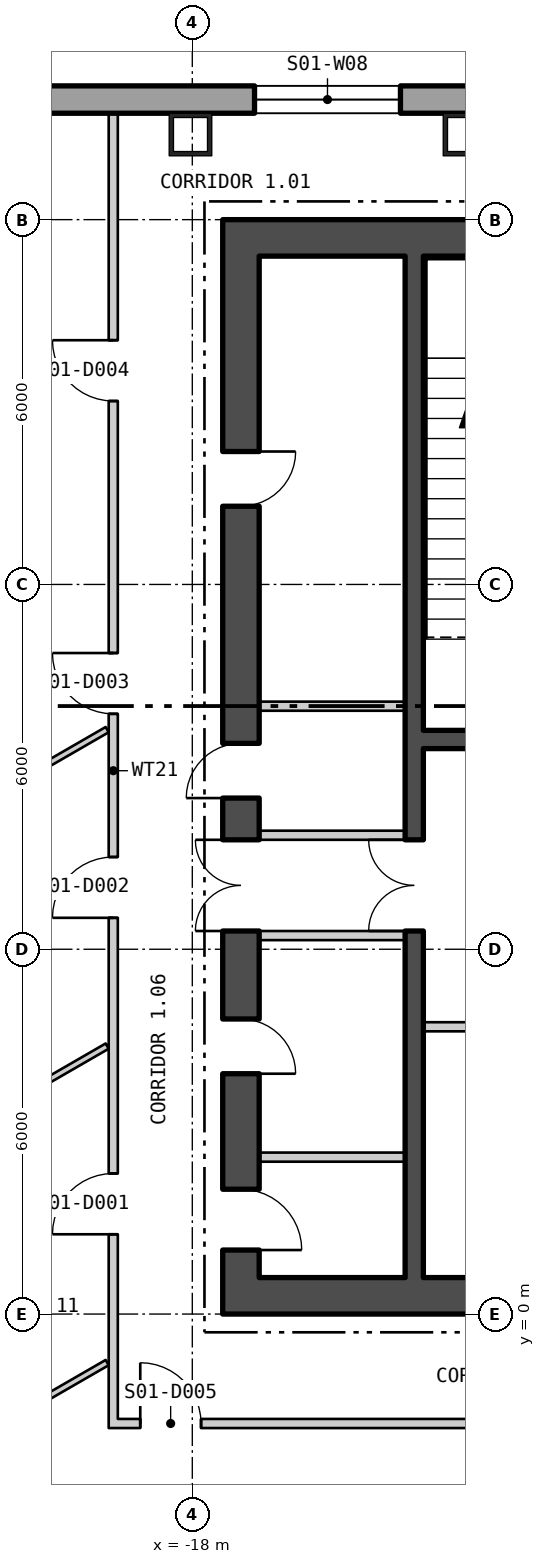
"""IFC4 building model, lengths in metres.
Left out: names, types, materials, properties, quantities, classifications, styles, units other than length and angle.
Written with IfcOpenShell. Run it as: python <this file> out.ifc"""

import sys

from ifc_helpers import new_model, si_unit, direction, frame, frame_2d, origin, origin_2d, place, context, subcontext, project, spatial, polyline, rectangle, hollow_rectangle, outline, extrude, element, fill, save


model = new_model("IFC4")
c1 = context("Model", 3, precision=1e-05, world=origin(), true_north=direction((0.0, 1.0)))
c2 = subcontext(c1, "Body", "Model", "MODEL_VIEW")
j1 = project(units=[si_unit("LENGTHUNIT", "METRE"), si_unit("PLANEANGLEUNIT", "RADIAN")], contexts=[c1])
p1 = place(None, origin())
s1 = spatial("IfcSite", under=j1, at=p1, CompositionType="ELEMENT")
p2 = place(p1, origin())
s2 = spatial("IfcBuilding", under=s1, at=p2, CompositionType="ELEMENT")
p3 = place(p2, frame((0.0, 0.0, 28.8)))
s3 = spatial("IfcBuildingStorey", under=s2, at=p3, CompositionType="ELEMENT", Elevation=28.8)
p4 = place(p3, frame((-13.523, 19.4, 0.0), z_axis=(0.0, 0.0, 1.0), x_axis=(-1.0, 0.0, 0.0)))
e1 = element("IfcColumn", 1, at=p4, inside=s3, PredefinedType="COLUMN", context=c2, shape_type="SweptSolid", body=[
    extrude(hollow_rectangle(XDim=0.7, YDim=0.7, WallThickness=0.07, at=origin_2d()), origin(), (0.0, 0.0, 1.0), 4.5),
])
p5 = place(p3, frame((-18.03, 19.4, -0.85), z_axis=(0.0, 0.0, 1.0), x_axis=(-1.0, 0.0, 0.0)))
e2 = element("IfcColumn", 2, at=p5, inside=s3, PredefinedType="COLUMN", context=c2, shape_type="SweptSolid", body=[
    extrude(hollow_rectangle(XDim=0.7, YDim=0.7, WallThickness=0.07, at=origin_2d()), origin(), (0.0, 0.0, 1.0), 5.35),
])
p6 = place(p3, frame((22.87, 19.975, -0.4), z_axis=(0.0, 0.0, 1.0), x_axis=(-1.0, 0.0, 0.0)))
e3 = element("IfcWall", 3, at=p6, inside=s3, PredefinedType="SOLIDWALL", context=c2, shape_type="SweptSolid", body=[
    extrude(outline(polyline([(-0.13, -0.225), (45.87, -0.225), (45.61, 0.225), (0.13, 0.225), (-0.13, -0.225)])), origin(), (0.0, 0.0, 1.0), 4.5),
])
p7 = place(p6, frame((5.893, 0.0, 1.3)))
e4 = element("IfcOpeningElement", 4, at=p7, cuts=e3, PredefinedType="OPENING", context=c2, shape_type="SweptSolid", body=[
    extrude(rectangle(XDim=2.4, YDim=2.6, at=frame_2d((1.2, 1.3))), frame((0.0, 0.235, 0.0), z_axis=(0.0, -1.0, 0.0), x_axis=(1.0, 0.0, 0.0)), (0.0, 0.0, 1.0), 0.47),
])
p8 = place(p6, frame((10.401, 0.0, 1.3)))
e5 = element("IfcOpeningElement", 5, at=p8, cuts=e3, PredefinedType="OPENING", context=c2, shape_type="SweptSolid", body=[
    extrude(rectangle(XDim=2.4, YDim=2.6, at=frame_2d((1.2, 1.3))), frame((0.0, 0.235, 0.0), z_axis=(0.0, -1.0, 0.0), x_axis=(1.0, 0.0, 0.0)), (0.0, 0.0, 1.0), 0.47),
])
p9 = place(p6, frame((14.909, 0.0, 1.3)))
e6 = element("IfcOpeningElement", 6, at=p9, cuts=e3, PredefinedType="OPENING", context=c2, shape_type="SweptSolid", body=[
    extrude(rectangle(XDim=2.4, YDim=2.6, at=frame_2d((1.2, 1.3))), frame((0.0, 0.235, 0.0), z_axis=(0.0, -1.0, 0.0), x_axis=(1.0, 0.0, 0.0)), (0.0, 0.0, 1.0), 0.47),
])
p10 = place(p6, frame((19.416, 0.0, 1.3)))
e7 = element("IfcOpeningElement", 7, at=p10, cuts=e3, PredefinedType="OPENING", context=c2, shape_type="SweptSolid", body=[
    extrude(rectangle(XDim=2.4, YDim=2.6, at=frame_2d((1.2, 1.3))), frame((0.0, 0.235, 0.0), z_axis=(0.0, -1.0, 0.0), x_axis=(1.0, 0.0, 0.0)), (0.0, 0.0, 1.0), 0.47),
])
p11 = place(p6, frame((23.924, 0.0, 1.3)))
e8 = element("IfcOpeningElement", 8, at=p11, cuts=e3, PredefinedType="OPENING", context=c2, shape_type="SweptSolid", body=[
    extrude(rectangle(XDim=2.4, YDim=2.6, at=frame_2d((1.2, 1.3))), frame((0.0, 0.235, 0.0), z_axis=(0.0, -1.0, 0.0), x_axis=(1.0, 0.0, 0.0)), (0.0, 0.0, 1.0), 0.47),
])
p12 = place(p6, frame((28.431, 0.0, 1.3)))
e9 = element("IfcOpeningElement", 9, at=p12, cuts=e3, PredefinedType="OPENING", context=c2, shape_type="SweptSolid", body=[
    extrude(rectangle(XDim=2.4, YDim=2.6, at=frame_2d((1.2, 1.3))), frame((0.0, 0.235, 0.0), z_axis=(0.0, -1.0, 0.0), x_axis=(1.0, 0.0, 0.0)), (0.0, 0.0, 1.0), 0.47),
])
p13 = place(p6, frame((32.939, 0.0, 1.3)))
e10 = element("IfcOpeningElement", 10, at=p13, cuts=e3, PredefinedType="OPENING", context=c2, shape_type="SweptSolid", body=[
    extrude(rectangle(XDim=2.4, YDim=2.6, at=frame_2d((1.2, 1.3))), frame((0.0, 0.235, 0.0), z_axis=(0.0, -1.0, 0.0), x_axis=(1.0, 0.0, 0.0)), (0.0, 0.0, 1.0), 0.47),
])
p14 = place(p6, frame((37.447, 0.0, 1.3)))
e11 = element("IfcOpeningElement", 11, at=p14, cuts=e3, PredefinedType="OPENING", context=c2, shape_type="SweptSolid", body=[
    extrude(rectangle(XDim=2.4, YDim=2.6, at=frame_2d((1.2, 1.3))), frame((0.0, 0.235, 0.0), z_axis=(0.0, -1.0, 0.0), x_axis=(1.0, 0.0, 0.0)), (0.0, 0.0, 1.0), 0.47),
])
p15 = place(p3, frame((-28.74, 9.808, -0.23), z_axis=(0.0, 0.0, 1.0), x_axis=(0.499999764979, -0.866025539474, 0.0)))
e12 = element("IfcWall", 12, at=p15, inside=s3, PredefinedType="SOLIDWALL", context=c2, shape_type="SweptSolid", body=[
    extrude(outline(polyline([(-0.13, -0.225), (45.87, -0.225), (45.61, 0.225), (0.13, 0.225), (-0.13, -0.225)])), origin(), (0.0, 0.0, 1.0), 4.55),
])
p16 = place(p15, frame((1.724, 0.0, 0.23)))
e13 = element("IfcOpeningElement", 13, at=p16, cuts=e12, PredefinedType="OPENING", context=c2, shape_type="SweptSolid", body=[
    extrude(rectangle(XDim=1.8, YDim=2.4, at=frame_2d((0.9, 1.2))), frame((0.0, 0.235, 0.0), z_axis=(0.0, -1.0, 0.0), x_axis=(1.0, 0.0, 0.0)), (0.0, 0.0, 1.0), 0.47),
])
p17 = place(p15, frame((5.893, 0.0, 1.13)))
e14 = element("IfcOpeningElement", 14, at=p17, cuts=e12, PredefinedType="OPENING", context=c2, shape_type="SweptSolid", body=[
    extrude(rectangle(XDim=2.4, YDim=2.6, at=frame_2d((1.2, 1.3))), frame((0.0, 0.235, 0.0), z_axis=(0.0, -1.0, 0.0), x_axis=(1.0, 0.0, 0.0)), (0.0, 0.0, 1.0), 0.47),
])
p18 = place(p15, frame((10.401, 0.0, 1.13)))
e15 = element("IfcOpeningElement", 15, at=p18, cuts=e12, PredefinedType="OPENING", context=c2, shape_type="SweptSolid", body=[
    extrude(rectangle(XDim=2.4, YDim=2.6, at=frame_2d((1.2, 1.3))), frame((0.0, 0.235, 0.0), z_axis=(0.0, -1.0, 0.0), x_axis=(1.0, 0.0, 0.0)), (0.0, 0.0, 1.0), 0.47),
])
p19 = place(p15, frame((14.909, 0.0, 1.13)))
e16 = element("IfcOpeningElement", 16, at=p19, cuts=e12, PredefinedType="OPENING", context=c2, shape_type="SweptSolid", body=[
    extrude(rectangle(XDim=2.4, YDim=2.6, at=frame_2d((1.2, 1.3))), frame((0.0, 0.235, 0.0), z_axis=(0.0, -1.0, 0.0), x_axis=(1.0, 0.0, 0.0)), (0.0, 0.0, 1.0), 0.47),
])
p20 = place(p15, frame((19.416, 0.0, 1.13)))
e17 = element("IfcOpeningElement", 17, at=p20, cuts=e12, PredefinedType="OPENING", context=c2, shape_type="SweptSolid", body=[
    extrude(rectangle(XDim=2.4, YDim=2.6, at=frame_2d((1.2, 1.3))), frame((0.0, 0.235, 0.0), z_axis=(0.0, -1.0, 0.0), x_axis=(1.0, 0.0, 0.0)), (0.0, 0.0, 1.0), 0.47),
])
p21 = place(p15, frame((23.924, 0.0, 1.13)))
e18 = element("IfcOpeningElement", 18, at=p21, cuts=e12, PredefinedType="OPENING", context=c2, shape_type="SweptSolid", body=[
    extrude(rectangle(XDim=2.4, YDim=2.6, at=frame_2d((1.2, 1.3))), frame((0.0, 0.235, 0.0), z_axis=(0.0, -1.0, 0.0), x_axis=(1.0, 0.0, 0.0)), (0.0, 0.0, 1.0), 0.47),
])
p22 = place(p15, frame((28.431, 0.0, 1.13)))
e19 = element("IfcOpeningElement", 19, at=p22, cuts=e12, PredefinedType="OPENING", context=c2, shape_type="SweptSolid", body=[
    extrude(rectangle(XDim=2.4, YDim=2.6, at=frame_2d((1.2, 1.3))), frame((0.0, 0.235, 0.0), z_axis=(0.0, -1.0, 0.0), x_axis=(1.0, 0.0, 0.0)), (0.0, 0.0, 1.0), 0.47),
])
p23 = place(p15, frame((33.239, 0.0, 0.23)))
e20 = element("IfcOpeningElement", 20, at=p23, cuts=e12, PredefinedType="OPENING", context=c2, shape_type="SweptSolid", body=[
    extrude(rectangle(XDim=1.8, YDim=2.4, at=frame_2d((0.9, 1.2))), frame((0.0, 0.235, 0.0), z_axis=(0.0, -1.0, 0.0), x_axis=(1.0, 0.0, 0.0)), (0.0, 0.0, 1.0), 0.47),
])
p24 = place(p15, frame((37.447, 0.0, 1.13)))
e21 = element("IfcOpeningElement", 21, at=p24, cuts=e12, PredefinedType="OPENING", context=c2, shape_type="SweptSolid", body=[
    extrude(rectangle(XDim=2.4, YDim=2.6, at=frame_2d((1.2, 1.3))), frame((0.0, 0.235, 0.0), z_axis=(0.0, -1.0, 0.0), x_axis=(1.0, 0.0, 0.0)), (0.0, 0.0, 1.0), 0.47),
])
p25 = place(p15, frame((41.916, 0.0, 1.13)))
e22 = element("IfcOpeningElement", 22, at=p25, cuts=e12, PredefinedType="OPENING", context=c2, shape_type="SweptSolid", body=[
    extrude(rectangle(XDim=2.4, YDim=2.6, at=frame_2d((1.2, 1.3))), frame((0.0, 0.235, 0.0), z_axis=(0.0, -1.0, 0.0), x_axis=(1.0, 0.0, 0.0)), (0.0, 0.0, 1.0), 0.47),
])
p26 = place(p3, frame((-17.5, 0.3, 0.0), z_axis=(0.0, 0.0, 1.0), x_axis=(1.0, 0.0, 0.0)))
e23 = element("IfcWall", 23, at=p26, inside=s3, PredefinedType="SHEAR", context=c2, shape_type="SweptSolid", body=[
    extrude(rectangle(XDim=35.0, YDim=0.6, at=frame_2d((17.5, 0.0))), origin(), (0.0, 0.0, 1.0), 4.3),
])
p27 = place(p26, frame((12.0, 0.0, 0.0)))
e24 = element("IfcOpeningElement", 24, at=p27, cuts=e23, PredefinedType="OPENING", context=c2, shape_type="SweptSolid", body=[
    extrude(rectangle(XDim=1.8, YDim=2.4, at=frame_2d((0.9, 1.2))), frame((0.0, 0.31, 0.0), z_axis=(0.0, -1.0, 0.0), x_axis=(1.0, 0.0, 0.0)), (0.0, 0.0, 1.0), 0.62),
])
p28 = place(p26, frame((22.0, 0.0, 0.0)))
e25 = element("IfcOpeningElement", 25, at=p28, cuts=e23, PredefinedType="OPENING", context=c2, shape_type="SweptSolid", body=[
    extrude(rectangle(XDim=1.8, YDim=2.4, at=frame_2d((0.9, 1.2))), frame((0.0, 0.31, 0.0), z_axis=(0.0, -1.0, 0.0), x_axis=(1.0, 0.0, 0.0)), (0.0, 0.0, 1.0), 0.62),
])
p29 = place(p3, frame((-17.5, 17.7, 0.0), z_axis=(0.0, 0.0, 1.0), x_axis=(1.0, 0.0, 0.0)))
e26 = element("IfcWall", 26, at=p29, inside=s3, PredefinedType="SHEAR", context=c2, shape_type="SweptSolid", body=[
    extrude(rectangle(XDim=35.0, YDim=0.6, at=frame_2d((17.5, 0.0))), origin(), (0.0, 0.0, 1.0), 4.3),
])
p30 = place(p3, frame((-17.2, 0.6, 0.0), z_axis=(0.0, 0.0, 1.0), x_axis=(0.0, 1.0, 0.0)))
e27 = element("IfcWall", 27, at=p30, inside=s3, PredefinedType="SHEAR", context=c2, shape_type="SweptSolid", body=[
    extrude(rectangle(XDim=16.8, YDim=0.6, at=frame_2d((8.4, 0.0))), origin(), (0.0, 0.0, 1.0), 4.3),
])
p31 = place(p30, frame((5.7, 0.0, 0.0)))
e28 = element("IfcOpeningElement", 28, at=p31, cuts=e27, PredefinedType="OPENING", context=c2, shape_type="SweptSolid", body=[
    extrude(rectangle(XDim=1.5, YDim=2.1, at=frame_2d((0.75, 1.05))), frame((0.0, 0.31, 0.0), z_axis=(0.0, -1.0, 0.0), x_axis=(1.0, 0.0, 0.0)), (0.0, 0.0, 1.0), 0.62),
])
p32 = place(p30, frame((0.453, 0.0, 0.0)))
e29 = element("IfcOpeningElement", 29, at=p32, cuts=e27, PredefinedType="OPENING", context=c2, shape_type="SweptSolid", body=[
    extrude(rectangle(XDim=1.0, YDim=2.1, at=frame_2d((0.5, 1.05))), frame((0.0, 0.31, 0.0), z_axis=(0.0, -1.0, 0.0), x_axis=(1.0, 0.0, 0.0)), (0.0, 0.0, 1.0), 0.62),
])
p33 = place(p30, frame((3.353, 0.0, 0.0)))
e30 = element("IfcOpeningElement", 30, at=p33, cuts=e27, PredefinedType="OPENING", context=c2, shape_type="SweptSolid", body=[
    extrude(rectangle(XDim=0.9, YDim=2.1, at=frame_2d((0.45, 1.05))), frame((0.0, 0.31, 0.0), z_axis=(0.0, -1.0, 0.0), x_axis=(1.0, 0.0, 0.0)), (0.0, 0.0, 1.0), 0.62),
])
p34 = place(p30, frame((7.886, 0.0, 0.0)))
e31 = element("IfcOpeningElement", 31, at=p34, cuts=e27, PredefinedType="OPENING", context=c2, shape_type="SweptSolid", body=[
    extrude(rectangle(XDim=0.9, YDim=2.1, at=frame_2d((0.45, 1.05))), frame((0.0, 0.31, 0.0), z_axis=(0.0, -1.0, 0.0), x_axis=(1.0, 0.0, 0.0)), (0.0, 0.0, 1.0), 0.62),
])
p35 = place(p30, frame((12.686, 0.0, 0.0)))
e32 = element("IfcOpeningElement", 32, at=p35, cuts=e27, PredefinedType="OPENING", context=c2, shape_type="SweptSolid", body=[
    extrude(rectangle(XDim=0.9, YDim=2.1, at=frame_2d((0.45, 1.05))), frame((0.0, 0.31, 0.0), z_axis=(0.0, -1.0, 0.0), x_axis=(1.0, 0.0, 0.0)), (0.0, 0.0, 1.0), 0.62),
])
p36 = place(p3, frame((-14.35, 0.6, 0.0), z_axis=(0.0, 0.0, 1.0), x_axis=(0.0, 1.0, 0.0)))
e33 = element("IfcWall", 33, at=p36, inside=s3, PredefinedType="SHEAR", context=c2, shape_type="SweptSolid", body=[
    extrude(rectangle(XDim=16.8, YDim=0.3, at=frame_2d((8.4, 0.0))), origin(), (0.0, 0.0, 1.0), 4.3),
])
p37 = place(p36, frame((5.7, 0.0, 0.0)))
e34 = element("IfcOpeningElement", 34, at=p37, cuts=e33, PredefinedType="OPENING", context=c2, shape_type="SweptSolid", body=[
    extrude(rectangle(XDim=1.5, YDim=2.1, at=frame_2d((0.75, 1.05))), frame((0.0, 0.16, 0.0), z_axis=(0.0, -1.0, 0.0), x_axis=(1.0, 0.0, 0.0)), (0.0, 0.0, 1.0), 0.32),
])
p38 = place(p3, frame((-14.2, 9.45, 0.0), z_axis=(0.0, 0.0, 1.0), x_axis=(1.0, 0.0, 0.0)))
e35 = element("IfcWall", 35, at=p38, inside=s3, PredefinedType="SHEAR", context=c2, shape_type="SweptSolid", body=[
    extrude(rectangle(XDim=3.2, YDim=0.3, at=frame_2d((1.6, 0.0))), origin(), (0.0, 0.0, 1.0), 4.3),
])
p39 = place(p38, frame((1.0, 0.0, 0.0)))
e36 = element("IfcOpeningElement", 36, at=p39, cuts=e35, PredefinedType="OPENING", context=c2, shape_type="SweptSolid", body=[
    extrude(rectangle(XDim=1.2, YDim=2.1, at=frame_2d((0.6, 1.05))), frame((0.0, 0.16, 0.0), z_axis=(0.0, -1.0, 0.0), x_axis=(1.0, 0.0, 0.0)), (0.0, 0.0, 1.0), 0.32),
])
p40 = place(p3, frame((-14.2, 4.725, 0.0), z_axis=(0.0, 0.0, 1.0), x_axis=(1.0, 0.0, 0.0)))
e37 = element("IfcWall", 37, at=p40, inside=s3, PredefinedType="PARTITIONING", context=c2, shape_type="SweptSolid", body=[
    extrude(rectangle(XDim=3.2, YDim=0.15, at=frame_2d((1.6, 0.0))), origin(), (0.0, 0.0, 1.0), 4.3),
])
for number, where, z_axis, x_axis in (
    (38, (-16.9, 6.225, 0.0), (0.0, 0.0, 1.0), (1.0, 0.0, 0.0)),
    (39, (-16.9, 7.875, 0.0), (0.0, 0.0, 1.0), (1.0, 0.0, 0.0)),
    (40, (-16.9, 2.581, 0.0), (0.0, 0.0, 1.0), (1.0, 0.0, 0.0)),
    (41, (-16.9, 9.998, 0.0), (0.0, 0.0, 1.0), (1.0, 0.0, 0.0)),
):
    element("IfcWall", number, at=place(p3, frame(where, z_axis=z_axis, x_axis=x_axis)), inside=s3, PredefinedType="PARTITIONING", context=c2, shape_type="SweptSolid", body=[
        extrude(rectangle(XDim=2.4, YDim=0.15, at=frame_2d((1.2, 0.0))), origin(), (0.0, 0.0, 1.0), 4.3),
    ])
p41 = place(p3, frame((-25.736, 5.954, 0.0), z_axis=(0.0, 0.0, 1.0), x_axis=(0.866030807744, 0.499990639951, 0.0)))
e42 = element("IfcWall", 42, at=p41, inside=s3, PredefinedType="PARTITIONING", context=c2, shape_type="SweptSolid", body=[
    extrude(rectangle(XDim=7.316, YDim=0.1, at=frame_2d((3.658, 0.0))), origin(), (0.0, 0.0, 1.0), 4.3),
])
p42 = place(p3, frame((-23.482, 2.05, 0.0), z_axis=(0.0, 0.0, 1.0), x_axis=(0.866001867101, 0.500040764516, 0.0)))
e43 = element("IfcWall", 43, at=p42, inside=s3, PredefinedType="PARTITIONING", context=c2, shape_type="SweptSolid", body=[
    extrude(rectangle(XDim=4.714, YDim=0.1, at=frame_2d((2.357, 0.0))), origin(), (0.0, 0.0, 1.0), 4.3),
])
p43 = place(p3, frame((-21.228, -1.853, 0.0), z_axis=(0.0, 0.0, 1.0), x_axis=(0.866106696208, 0.499859170951, 0.0)))
e44 = element("IfcWall", 44, at=p43, inside=s3, PredefinedType="PARTITIONING", context=c2, shape_type="SweptSolid", body=[
    extrude(rectangle(XDim=2.111, YDim=0.1, at=frame_2d((1.055, 0.0))), origin(), (0.0, 0.0, 1.0), 4.3),
])
p44 = place(p3, frame((-19.3, -1.875, 0.0), z_axis=(0.0, 0.0, 1.0), x_axis=(0.0, 1.0, 0.0)))
e45 = element("IfcWall", 45, at=p44, inside=s3, PredefinedType="PARTITIONING", context=c2, shape_type="SweptSolid", body=[
    extrude(rectangle(XDim=21.623, YDim=0.15, at=frame_2d((10.812, 0.0))), origin(), (0.0, 0.0, 1.0), 4.3),
])
p45 = place(p44, frame((3.187, 0.0, 0.0)))
e46 = element("IfcOpeningElement", 46, at=p45, cuts=e45, PredefinedType="OPENING", context=c2, shape_type="SweptSolid", body=[
    extrude(rectangle(XDim=1.0, YDim=2.1, at=frame_2d((0.5, 1.05))), frame((0.0, 0.085, 0.0), z_axis=(0.0, -1.0, 0.0), x_axis=(1.0, 0.0, 0.0)), (0.0, 0.0, 1.0), 0.17),
])
p46 = place(p44, frame((8.392, 0.0, 0.0)))
e47 = element("IfcOpeningElement", 47, at=p46, cuts=e45, PredefinedType="OPENING", context=c2, shape_type="SweptSolid", body=[
    extrude(rectangle(XDim=1.0, YDim=2.1, at=frame_2d((0.5, 1.05))), frame((0.0, 0.085, 0.0), z_axis=(0.0, -1.0, 0.0), x_axis=(1.0, 0.0, 0.0)), (0.0, 0.0, 1.0), 0.17),
])
p47 = place(p44, frame((11.747, 0.0, 0.0)))
e48 = element("IfcOpeningElement", 48, at=p47, cuts=e45, PredefinedType="OPENING", context=c2, shape_type="SweptSolid", body=[
    extrude(rectangle(XDim=1.0, YDim=2.1, at=frame_2d((0.5, 1.05))), frame((0.0, 0.085, 0.0), z_axis=(0.0, -1.0, 0.0), x_axis=(1.0, 0.0, 0.0)), (0.0, 0.0, 1.0), 0.17),
])
p48 = place(p44, frame((16.892, 0.0, 0.0)))
e49 = element("IfcOpeningElement", 49, at=p48, cuts=e45, PredefinedType="OPENING", context=c2, shape_type="SweptSolid", body=[
    extrude(rectangle(XDim=1.0, YDim=2.1, at=frame_2d((0.5, 1.05))), frame((0.0, 0.085, 0.0), z_axis=(0.0, -1.0, 0.0), x_axis=(1.0, 0.0, 0.0)), (0.0, 0.0, 1.0), 0.17),
])
p49 = place(p3, frame((-19.225, -1.8, 0.0), z_axis=(0.0, 0.0, 1.0), x_axis=(1.0, 0.0, 0.0)))
e50 = element("IfcWall", 50, at=p49, inside=s3, PredefinedType="PARTITIONING", context=c2, shape_type="SweptSolid", body=[
    extrude(rectangle(XDim=11.15, YDim=0.15, at=frame_2d((5.575, 0.0))), origin(), (0.0, 0.0, 1.0), 4.3),
])
p50 = place(p49, frame((0.369, 0.0, 0.0)))
e51 = element("IfcOpeningElement", 51, at=p50, cuts=e50, PredefinedType="OPENING", context=c2, shape_type="SweptSolid", body=[
    extrude(rectangle(XDim=1.0, YDim=2.1, at=frame_2d((0.5, 1.05))), frame((0.0, 0.085, 0.0), z_axis=(0.0, -1.0, 0.0), x_axis=(1.0, 0.0, 0.0)), (0.0, 0.0, 1.0), 0.17),
])
p51 = place(p14, origin())
e52 = element("IfcWindow", 52, at=p51, inside=s3, PartitioningType="SINGLE_PANEL", PredefinedType="WINDOW", context=c2, shape_type="SweptSolid", body=[
    extrude(rectangle(XDim=2.4, YDim=2.6, at=frame_2d((1.2, 1.3))), frame((0.0, 0.105, 0.0), z_axis=(0.0, -1.0, 0.0), x_axis=(1.0, 0.0, 0.0)), (0.0, 0.0, 1.0), 0.06),
])
fill(e11, e52)
p52 = place(p37, origin())
e53 = element("IfcDoor", 53, at=p52, inside=s3, OperationType="DOUBLE_DOOR_SINGLE_SWING", PredefinedType="DOOR", context=c2, shape_type="SweptSolid", body=[
    extrude(rectangle(XDim=1.5, YDim=2.1, at=frame_2d((0.75, 1.05))), frame((0.0, 0.025, 0.0), z_axis=(0.0, -1.0, 0.0), x_axis=(1.0, 0.0, 0.0)), (0.0, 0.0, 1.0), 0.05),
])
fill(e34, e53)
p53 = place(p31, origin())
e54 = element("IfcDoor", 54, at=p53, inside=s3, OperationType="DOUBLE_DOOR_SINGLE_SWING", PredefinedType="DOOR", context=c2, shape_type="SweptSolid", body=[
    extrude(rectangle(XDim=1.5, YDim=2.1, at=frame_2d((0.75, 1.05))), frame((0.0, 0.025, 0.0), z_axis=(0.0, -1.0, 0.0), x_axis=(1.0, 0.0, 0.0)), (0.0, 0.0, 1.0), 0.05),
])
fill(e28, e54)
p54 = place(p32, origin())
e55 = element("IfcDoor", 55, at=p54, inside=s3, OperationType="SINGLE_SWING_LEFT", PredefinedType="DOOR", context=c2, shape_type="SweptSolid", body=[
    extrude(rectangle(XDim=1.0, YDim=2.1, at=frame_2d((0.5, 1.05))), frame((0.0, 0.025, 0.0), z_axis=(0.0, -1.0, 0.0), x_axis=(1.0, 0.0, 0.0)), (0.0, 0.0, 1.0), 0.05),
])
fill(e29, e55)
p55 = place(p33, origin())
e56 = element("IfcDoor", 56, at=p55, inside=s3, OperationType="SINGLE_SWING_LEFT", PredefinedType="DOOR", context=c2, shape_type="SweptSolid", body=[
    extrude(rectangle(XDim=0.9, YDim=2.1, at=frame_2d((0.45, 1.05))), frame((0.0, 0.025, 0.0), z_axis=(0.0, -1.0, 0.0), x_axis=(1.0, 0.0, 0.0)), (0.0, 0.0, 1.0), 0.05),
])
fill(e30, e56)
p56 = place(p34, origin())
e57 = element("IfcDoor", 57, at=p56, inside=s3, OperationType="SINGLE_SWING_RIGHT", PredefinedType="DOOR", context=c2, shape_type="SweptSolid", body=[
    extrude(rectangle(XDim=0.9, YDim=2.1, at=frame_2d((0.45, 1.05))), frame((0.0, 0.025, 0.0), z_axis=(0.0, -1.0, 0.0), x_axis=(1.0, 0.0, 0.0)), (0.0, 0.0, 1.0), 0.05),
])
fill(e31, e57)
p57 = place(p35, origin())
e58 = element("IfcDoor", 58, at=p57, inside=s3, OperationType="SINGLE_SWING_RIGHT", PredefinedType="DOOR", context=c2, shape_type="SweptSolid", body=[
    extrude(rectangle(XDim=0.9, YDim=2.1, at=frame_2d((0.45, 1.05))), frame((0.0, 0.025, 0.0), z_axis=(0.0, -1.0, 0.0), x_axis=(1.0, 0.0, 0.0)), (0.0, 0.0, 1.0), 0.05),
])
fill(e32, e58)
p58 = place(p45, origin())
e59 = element("IfcDoor", 59, at=p58, inside=s3, OperationType="SINGLE_SWING_RIGHT", PredefinedType="DOOR", context=c2, shape_type="SweptSolid", body=[
    extrude(rectangle(XDim=1.0, YDim=2.1, at=frame_2d((0.5, 1.05))), frame((0.0, 0.025, 0.0), z_axis=(0.0, -1.0, 0.0), x_axis=(1.0, 0.0, 0.0)), (0.0, 0.0, 1.0), 0.05),
])
fill(e46, e59)
p59 = place(p46, origin())
e60 = element("IfcDoor", 60, at=p59, inside=s3, OperationType="SINGLE_SWING_RIGHT", PredefinedType="DOOR", context=c2, shape_type="SweptSolid", body=[
    extrude(rectangle(XDim=1.0, YDim=2.1, at=frame_2d((0.5, 1.05))), frame((0.0, 0.025, 0.0), z_axis=(0.0, -1.0, 0.0), x_axis=(1.0, 0.0, 0.0)), (0.0, 0.0, 1.0), 0.05),
])
fill(e47, e60)
p60 = place(p47, origin())
e61 = element("IfcDoor", 61, at=p60, inside=s3, OperationType="SINGLE_SWING_LEFT", PredefinedType="DOOR", context=c2, shape_type="SweptSolid", body=[
    extrude(rectangle(XDim=1.0, YDim=2.1, at=frame_2d((0.5, 1.05))), frame((0.0, 0.025, 0.0), z_axis=(0.0, -1.0, 0.0), x_axis=(1.0, 0.0, 0.0)), (0.0, 0.0, 1.0), 0.05),
])
fill(e48, e61)
p61 = place(p48, origin())
e62 = element("IfcDoor", 62, at=p61, inside=s3, OperationType="SINGLE_SWING_LEFT", PredefinedType="DOOR", context=c2, shape_type="SweptSolid", body=[
    extrude(rectangle(XDim=1.0, YDim=2.1, at=frame_2d((0.5, 1.05))), frame((0.0, 0.025, 0.0), z_axis=(0.0, -1.0, 0.0), x_axis=(1.0, 0.0, 0.0)), (0.0, 0.0, 1.0), 0.05),
])
fill(e49, e62)
p62 = place(p50, origin())
e63 = element("IfcDoor", 63, at=p62, inside=s3, OperationType="SINGLE_SWING_RIGHT", PredefinedType="DOOR", context=c2, shape_type="SweptSolid", body=[
    extrude(rectangle(XDim=1.0, YDim=2.1, at=frame_2d((0.5, 1.05))), frame((0.0, 0.025, 0.0), z_axis=(0.0, -1.0, 0.0), x_axis=(1.0, 0.0, 0.0)), (0.0, 0.0, 1.0), 0.05),
])
fill(e51, e63)
save(model, sys.argv[1])
